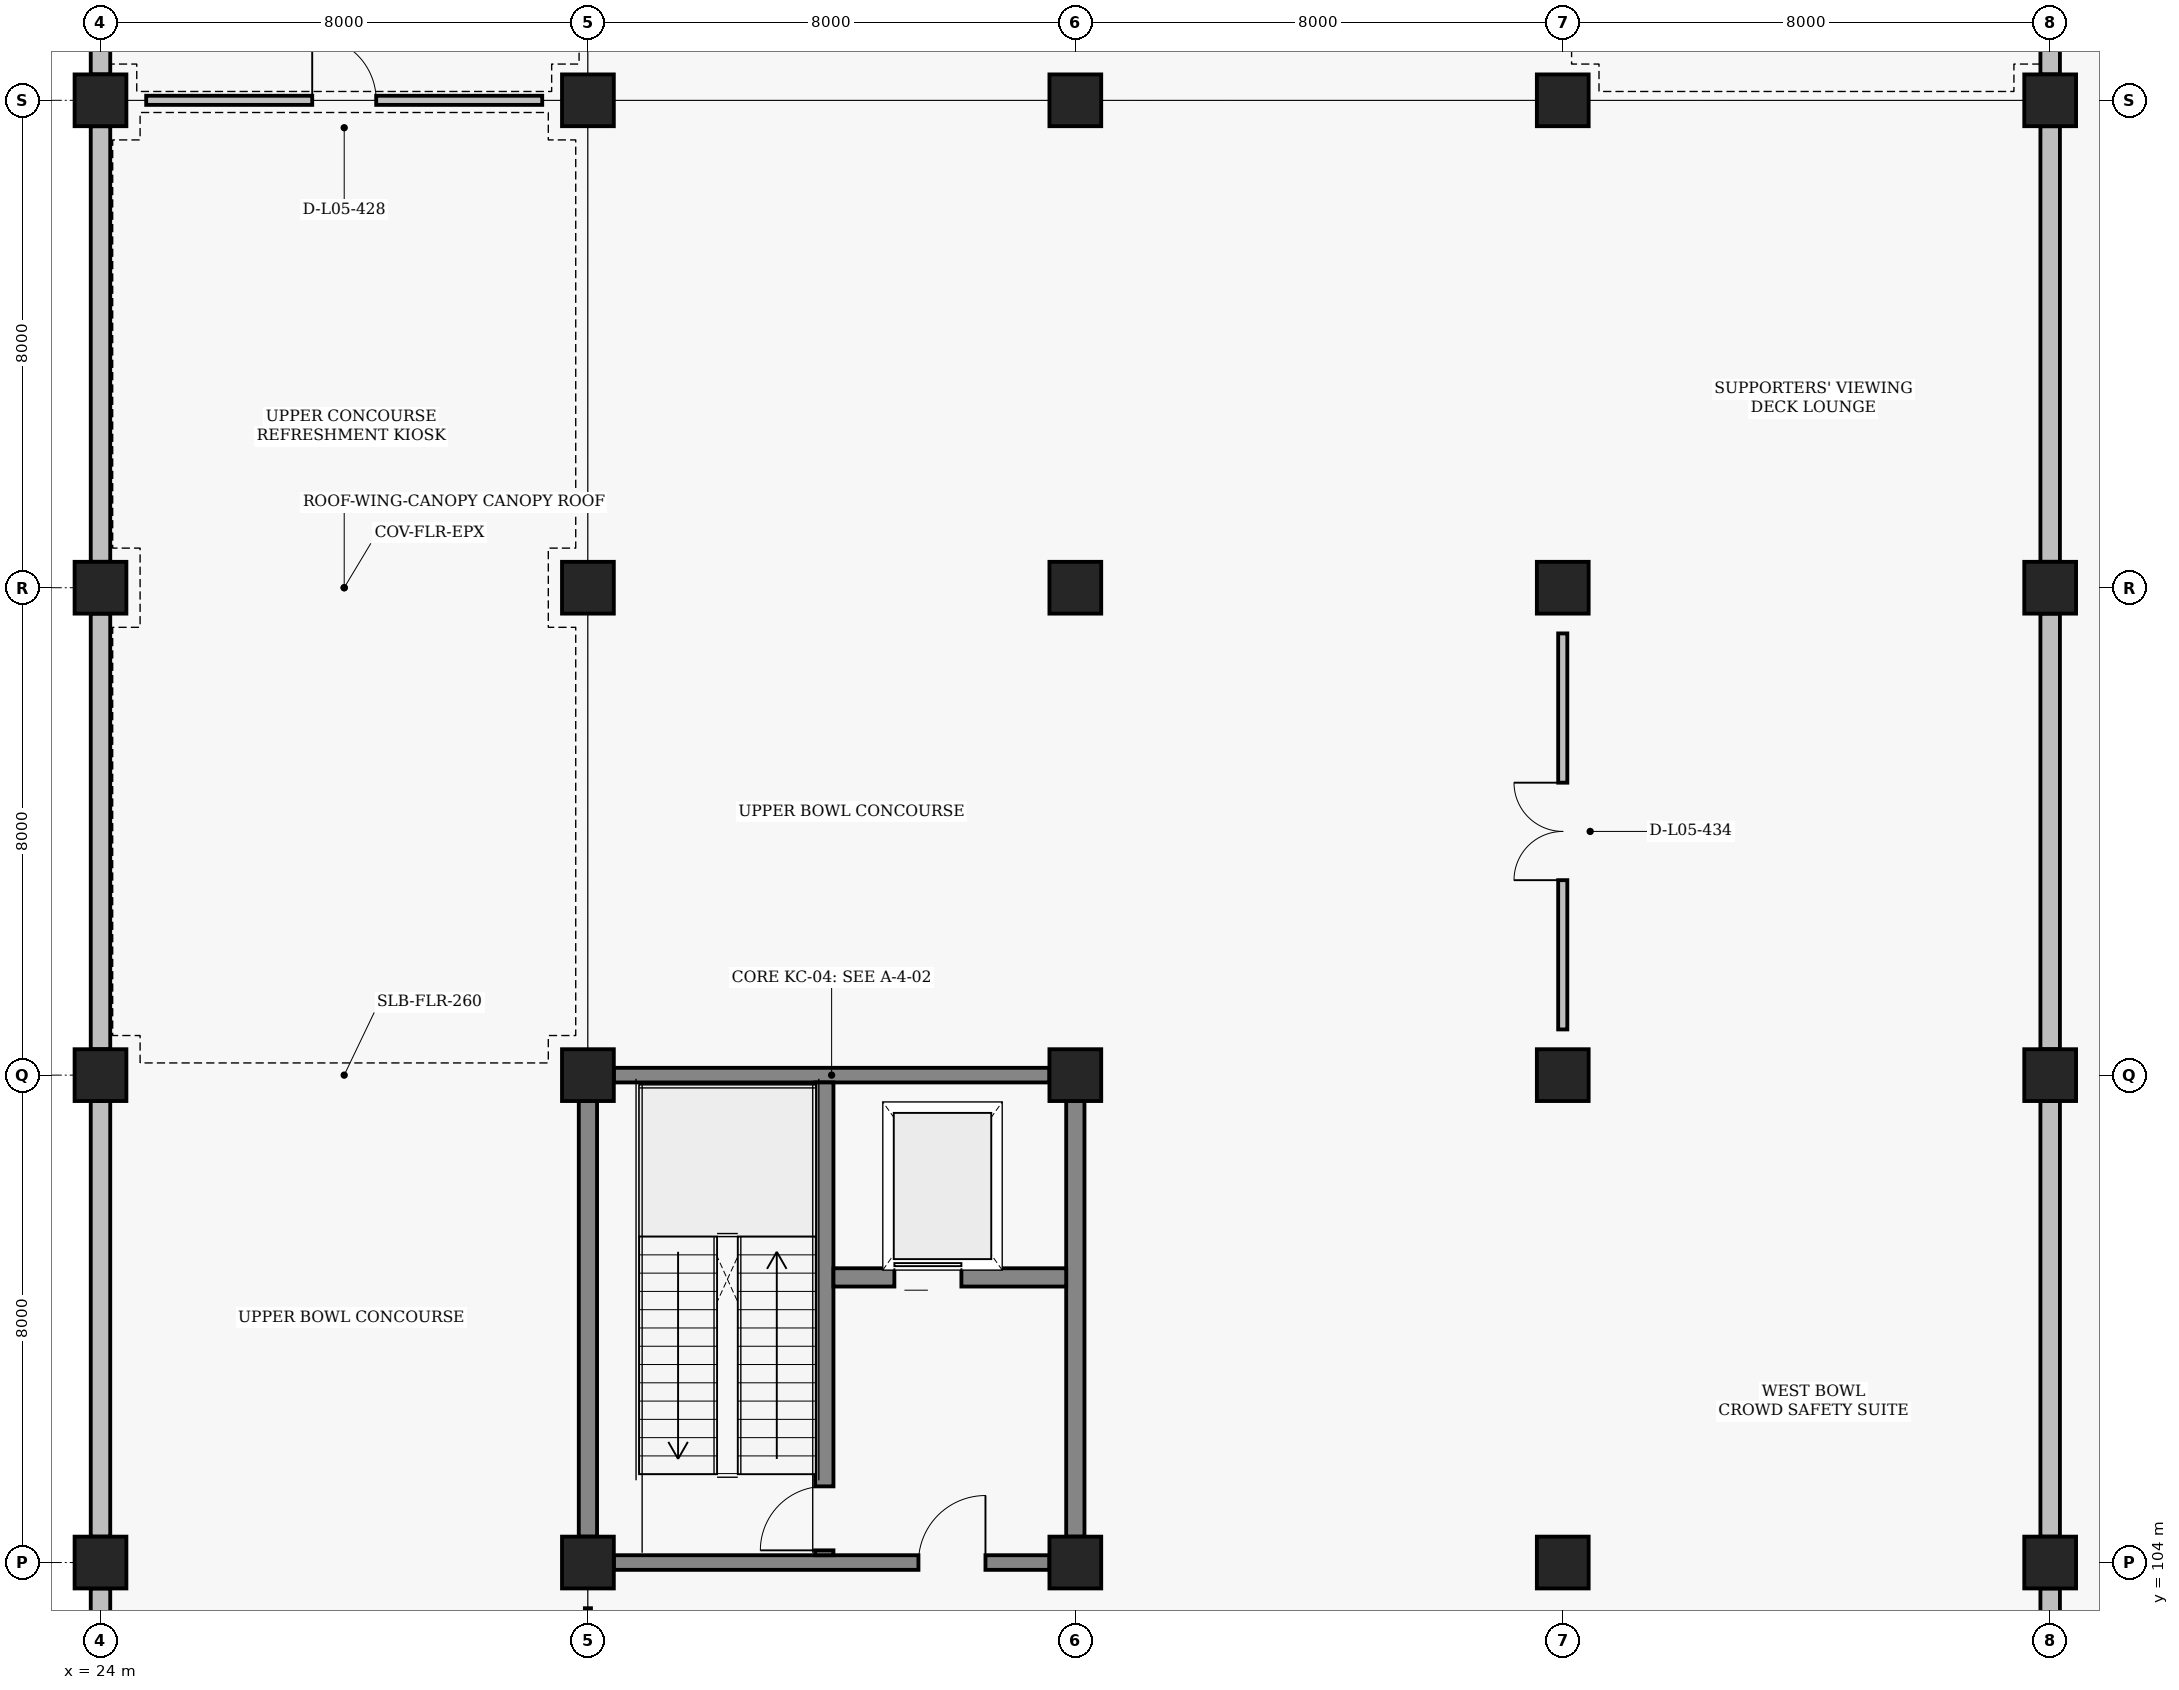
"""IFC4 building model, lengths in metres.
Left out: names, types, materials, properties, quantities, classifications, styles, units other than length and angle.
Written with IfcOpenShell. Run it as: python <this file> out.ifc"""

import sys

from ifc_helpers import new_model, si_unit, direction, frame, frame_2d, origin, origin_2d, place, context, subcontext, project, spatial, rectangle, extrude, element, fill, save


model = new_model("IFC4")
c1 = context("Model", 3, precision=1e-05, world=origin(), true_north=direction((0.0, 1.0)))
c2 = subcontext(c1, "Body", "Model", "MODEL_VIEW")
j1 = project(units=[si_unit("LENGTHUNIT", "METRE"), si_unit("PLANEANGLEUNIT", "RADIAN")], contexts=[c1])
p1 = place(None, origin())
s1 = spatial("IfcSite", under=j1, at=p1, CompositionType="ELEMENT")
p2 = place(p1, origin())
s2 = spatial("IfcBuilding", under=s1, at=p2, CompositionType="ELEMENT")
p3 = place(p2, frame((0.0, 0.0, 18.6)))
s3 = spatial("IfcBuildingStorey", under=s2, at=p3, CompositionType="ELEMENT", Elevation=18.6)
for number, where, z_axis, x_axis in (
    (1, (24.0, 104.0, 0.0), (0.0, 0.0, 1.0), (1.0, 0.0, 0.0)),
    (2, (24.0, 112.0, 0.0), (0.0, 0.0, 1.0), (1.0, 0.0, 0.0)),
    (3, (24.0, 120.0, 0.0), (0.0, 0.0, 1.0), (1.0, 0.0, 0.0)),
    (4, (24.0, 128.0, 0.0), (0.0, 0.0, 1.0), (1.0, 0.0, 0.0)),
    (5, (32.0, 104.0, 0.0), (0.0, 0.0, 1.0), (1.0, 0.0, 0.0)),
    (6, (32.0, 112.0, 0.0), (0.0, 0.0, 1.0), (1.0, 0.0, 0.0)),
    (7, (32.0, 120.0, 0.0), (0.0, 0.0, 1.0), (1.0, 0.0, 0.0)),
    (8, (32.0, 128.0, 0.0), (0.0, 0.0, 1.0), (1.0, 0.0, 0.0)),
    (9, (40.0, 104.0, 0.0), (0.0, 0.0, 1.0), (1.0, 0.0, 0.0)),
    (10, (40.0, 112.0, 0.0), (0.0, 0.0, 1.0), (1.0, 0.0, 0.0)),
    (11, (40.0, 120.0, 0.0), (0.0, 0.0, 1.0), (1.0, 0.0, 0.0)),
    (12, (40.0, 128.0, 0.0), (0.0, 0.0, 1.0), (1.0, 0.0, 0.0)),
    (13, (48.0, 104.0, 0.0), (0.0, 0.0, 1.0), (1.0, 0.0, 0.0)),
    (14, (48.0, 112.0, 0.0), (0.0, 0.0, 1.0), (1.0, 0.0, 0.0)),
    (15, (48.0, 120.0, 0.0), (0.0, 0.0, 1.0), (1.0, 0.0, 0.0)),
    (16, (48.0, 128.0, 0.0), (0.0, 0.0, 1.0), (1.0, 0.0, 0.0)),
    (17, (56.0, 104.0, 0.0), (0.0, 0.0, 1.0), (1.0, 0.0, 0.0)),
    (18, (56.0, 112.0, 0.0), (0.0, 0.0, 1.0), (1.0, 0.0, 0.0)),
    (19, (56.0, 120.0, 0.0), (0.0, 0.0, 1.0), (1.0, 0.0, 0.0)),
    (20, (56.0, 128.0, 0.0), (0.0, 0.0, 1.0), (1.0, 0.0, 0.0)),
):
    element("IfcColumn", number, at=place(p3, frame(where, z_axis=z_axis, x_axis=x_axis)), inside=s3, PredefinedType="COLUMN", context=c2, shape_type="SweptSolid", body=[
        extrude(rectangle(XDim=0.85, YDim=0.85, at=origin_2d()), origin(), (0.0, 0.0, 1.0), 4.2),
    ])
for number, where, z_axis, x_axis in (
    (21, (24.0, 96.425, 0.0), (0.0, 0.0, 1.0), (0.0, 1.0, 0.0)),
    (22, (24.0, 104.425, 0.0), (0.0, 0.0, 1.0), (0.0, 1.0, 0.0)),
    (23, (24.0, 112.425, 0.0), (0.0, 0.0, 1.0), (0.0, 1.0, 0.0)),
    (24, (24.0, 120.425, 0.0), (0.0, 0.0, 1.0), (0.0, 1.0, 0.0)),
    (25, (24.0, 128.425, 0.0), (0.0, 0.0, 1.0), (0.0, 1.0, 0.0)),
):
    element("IfcWall", number, at=place(p3, frame(where, z_axis=z_axis, x_axis=x_axis)), inside=s3, PredefinedType="SOLIDWALL", context=c2, shape_type="SweptSolid", body=[
        extrude(rectangle(XDim=7.15, YDim=0.32, at=frame_2d((3.575, 0.0))), origin(), (0.0, 0.0, 1.0), 3.34),
    ])
for number, where, z_axis, x_axis in (
    (26, (56.0, 96.425, 0.0), (0.0, 0.0, 1.0), (0.0, 1.0, 0.0)),
    (27, (56.0, 104.425, 0.0), (0.0, 0.0, 1.0), (0.0, 1.0, 0.0)),
    (28, (56.0, 112.425, 0.0), (0.0, 0.0, 1.0), (0.0, 1.0, 0.0)),
    (29, (56.0, 120.425, 0.0), (0.0, 0.0, 1.0), (0.0, 1.0, 0.0)),
    (30, (56.0, 128.425, 0.0), (0.0, 0.0, 1.0), (0.0, 1.0, 0.0)),
):
    element("IfcWall", number, at=place(p3, frame(where, z_axis=z_axis, x_axis=x_axis)), inside=s3, PredefinedType="SOLIDWALL", context=c2, shape_type="SweptSolid", body=[
        extrude(rectangle(XDim=7.15, YDim=0.32, at=frame_2d((3.575, 0.0))), origin(), (0.0, 0.0, 1.0), 3.35),
    ])
p4 = place(p3, frame((32.425, 104.0, 0.0), z_axis=(0.0, 0.0, 1.0), x_axis=(1.0, 0.0, 0.0)))
e31 = element("IfcWall", 31, at=p4, inside=s3, PredefinedType="SHEAR", context=c2, shape_type="SweptSolid", body=[
    extrude(rectangle(XDim=7.15, YDim=0.24, at=frame_2d((3.575, 0.0))), origin(), (0.0, 0.0, 1.0), 3.34),
])
p5 = place(p4, frame((5.0, 0.0, 0.0)))
e32 = element("IfcOpeningElement", 32, at=p5, cuts=e31, PredefinedType="OPENING", context=c2, shape_type="SweptSolid", body=[
    extrude(rectangle(XDim=1.1, YDim=2.2, at=frame_2d((0.55, 1.1))), frame((0.0, 0.13, 0.0), z_axis=(0.0, -1.0, 0.0), x_axis=(1.0, 0.0, 0.0)), (0.0, 0.0, 1.0), 0.26),
])
p6 = place(p3, frame((32.425, 112.0, 0.0), z_axis=(0.0, 0.0, 1.0), x_axis=(1.0, 0.0, 0.0)))
e33 = element("IfcWall", 33, at=p6, inside=s3, PredefinedType="SHEAR", context=c2, shape_type="SweptSolid", body=[
    extrude(rectangle(XDim=7.15, YDim=0.24, at=frame_2d((3.575, 0.0))), origin(), (0.0, 0.0, 1.0), 3.34),
])
for number, where, z_axis, x_axis in (
    (34, (32.0, 104.425, 0.0), (0.0, 0.0, 1.0), (0.0, 1.0, 0.0)),
    (35, (40.0, 104.425, 0.0), (0.0, 0.0, 1.0), (0.0, 1.0, 0.0)),
):
    element("IfcWall", number, at=place(p3, frame(where, z_axis=z_axis, x_axis=x_axis)), inside=s3, PredefinedType="SHEAR", context=c2, shape_type="SweptSolid", body=[
        extrude(rectangle(XDim=7.15, YDim=0.3, at=frame_2d((3.575, 0.0))), origin(), (0.0, 0.0, 1.0), 3.34),
    ])
p7 = place(p3, frame((35.88, 104.12, 0.0), z_axis=(0.0, 0.0, 1.0), x_axis=(0.0, 1.0, 0.0)))
e36 = element("IfcWall", 36, at=p7, inside=s3, PredefinedType="SHEAR", context=c2, shape_type="SweptSolid", body=[
    extrude(rectangle(XDim=7.76, YDim=0.3, at=frame_2d((3.88, 0.0))), origin(), (0.0, 0.0, 1.0), 3.44),
])
p8 = place(p7, frame((0.08, 0.0, 0.0)))
e37 = element("IfcOpeningElement", 37, at=p8, cuts=e36, PredefinedType="OPENING", context=c2, shape_type="SweptSolid", body=[
    extrude(rectangle(XDim=1.05, YDim=2.15, at=frame_2d((0.525, 1.075))), frame((0.0, 0.16, 0.0), z_axis=(0.0, -1.0, 0.0), x_axis=(1.0, 0.0, 0.0)), (0.0, 0.0, 1.0), 0.32),
])
p9 = place(p3, frame((36.03, 108.68, 0.0), z_axis=(0.0, 0.0, 1.0), x_axis=(1.0, 0.0, 0.0)))
e38 = element("IfcWall", 38, at=p9, inside=s3, PredefinedType="SHEAR", context=c2, shape_type="SweptSolid", body=[
    extrude(rectangle(XDim=3.82, YDim=0.3, at=frame_2d((1.91, 0.0))), origin(), (0.0, 0.0, 1.0), 3.34),
])
p10 = place(p9, frame((1.0, 0.0, 0.0)))
e39 = element("IfcOpeningElement", 39, at=p10, cuts=e38, PredefinedType="OPENING", context=c2, shape_type="SweptSolid", body=[
    extrude(rectangle(XDim=1.1, YDim=2.15, at=frame_2d((0.55, 1.075))), frame((0.0, 0.16, 0.0), z_axis=(0.0, -1.0, 0.0), x_axis=(1.0, 0.0, 0.0)), (0.0, 0.0, 1.0), 0.32),
])
p11 = place(p3, frame((24.75, 128.0, 0.0), z_axis=(0.0, 0.0, 1.0), x_axis=(1.0, 0.0, 0.0)))
e40 = element("IfcWall", 40, at=p11, inside=s3, PredefinedType="PARTITIONING", context=c2, shape_type="SweptSolid", body=[
    extrude(rectangle(XDim=6.5, YDim=0.15, at=frame_2d((3.25, 0.0))), origin(), (0.0, 0.0, 1.0), 3.44),
])
p12 = place(p11, frame((2.725, 0.0, 0.0)))
e41 = element("IfcOpeningElement", 41, at=p12, cuts=e40, PredefinedType="OPENING", context=c2, shape_type="SweptSolid", body=[
    extrude(rectangle(XDim=1.05, YDim=2.15, at=frame_2d((0.525, 1.075))), frame((0.0, 0.085, 0.0), z_axis=(0.0, -1.0, 0.0), x_axis=(1.0, 0.0, 0.0)), (0.0, 0.0, 1.0), 0.17),
])
p13 = place(p3, frame((32.0, 96.75, 0.0), z_axis=(0.0, 0.0, 1.0), x_axis=(0.0, 1.0, 0.0)))
e42 = element("IfcWall", 42, at=p13, inside=s3, PredefinedType="PARTITIONING", context=c2, shape_type="SweptSolid", body=[
    extrude(rectangle(XDim=6.5, YDim=0.1, at=frame_2d((3.25, 0.0))), origin(), (0.0, 0.0, 1.0), 3.34),
])
p14 = place(p13, frame((2.775, 0.0, 0.0)))
e43 = element("IfcOpeningElement", 43, at=p14, cuts=e42, PredefinedType="OPENING", context=c2, shape_type="SweptSolid", body=[
    extrude(rectangle(XDim=0.95, YDim=2.1, at=frame_2d((0.475, 1.05))), frame((0.0, 0.06, 0.0), z_axis=(0.0, -1.0, 0.0), x_axis=(1.0, 0.0, 0.0)), (0.0, 0.0, 1.0), 0.12),
])
p15 = place(p3, frame((48.0, 112.75, 0.0), z_axis=(0.0, 0.0, 1.0), x_axis=(0.0, 1.0, 0.0)))
e44 = element("IfcWall", 44, at=p15, inside=s3, PredefinedType="PARTITIONING", context=c2, shape_type="SweptSolid", body=[
    extrude(rectangle(XDim=6.5, YDim=0.15, at=frame_2d((3.25, 0.0))), origin(), (0.0, 0.0, 1.0), 3.34),
])
p16 = place(p15, frame((2.45, 0.0, 0.0)))
e45 = element("IfcOpeningElement", 45, at=p16, cuts=e44, PredefinedType="OPENING", context=c2, shape_type="SweptSolid", body=[
    extrude(rectangle(XDim=1.6, YDim=2.2, at=frame_2d((0.8, 1.1))), frame((0.0, 0.085, 0.0), z_axis=(0.0, -1.0, 0.0), x_axis=(1.0, 0.0, 0.0)), (0.0, 0.0, 1.0), 0.17),
])
p17 = place(p5, origin())
e46 = element("IfcDoor", 46, at=p17, inside=s3, OperationType="SINGLE_SWING_RIGHT", PredefinedType="DOOR", context=c2, shape_type="SweptSolid", body=[
    extrude(rectangle(XDim=1.1, YDim=2.2, at=frame_2d((0.55, 1.1))), frame((0.0, 0.025, 0.0), z_axis=(0.0, -1.0, 0.0), x_axis=(1.0, 0.0, 0.0)), (0.0, 0.0, 1.0), 0.05),
])
fill(e32, e46)
p18 = place(p8, origin())
e47 = element("IfcDoor", 47, at=p18, inside=s3, OperationType="SINGLE_SWING_LEFT", PredefinedType="DOOR", context=c2, shape_type="SweptSolid", body=[
    extrude(rectangle(XDim=1.05, YDim=2.15, at=frame_2d((0.525, 1.075))), frame((0.0, 0.025, 0.0), z_axis=(0.0, -1.0, 0.0), x_axis=(1.0, 0.0, 0.0)), (0.0, 0.0, 1.0), 0.05),
])
fill(e37, e47)
p19 = place(p10, origin())
e48 = element("IfcDoor", 48, at=p19, inside=s3, OperationType="SLIDING_TO_LEFT", PredefinedType="DOOR", context=c2, shape_type="SweptSolid", body=[
    extrude(rectangle(XDim=1.1, YDim=2.15, at=frame_2d((0.55, 1.075))), frame((0.0, 0.025, 0.0), z_axis=(0.0, -1.0, 0.0), x_axis=(1.0, 0.0, 0.0)), (0.0, 0.0, 1.0), 0.05),
])
fill(e39, e48)
p20 = place(p12, origin())
e49 = element("IfcDoor", 49, at=p20, inside=s3, OperationType="SINGLE_SWING_LEFT", PredefinedType="DOOR", context=c2, shape_type="SweptSolid", body=[
    extrude(rectangle(XDim=1.05, YDim=2.15, at=frame_2d((0.525, 1.075))), frame((0.0, 0.025, 0.0), z_axis=(0.0, -1.0, 0.0), x_axis=(1.0, 0.0, 0.0)), (0.0, 0.0, 1.0), 0.05),
])
fill(e41, e49)
p21 = place(p16, origin())
e50 = element("IfcDoor", 50, at=p21, inside=s3, OperationType="DOUBLE_SWING_LEFT", PredefinedType="DOOR", context=c2, shape_type="SweptSolid", body=[
    extrude(rectangle(XDim=1.6, YDim=2.2, at=frame_2d((0.8, 1.1))), frame((0.0, 0.025, 0.0), z_axis=(0.0, -1.0, 0.0), x_axis=(1.0, 0.0, 0.0)), (0.0, 0.0, 1.0), 0.05),
])
fill(e45, e50)
save(model, sys.argv[1])
